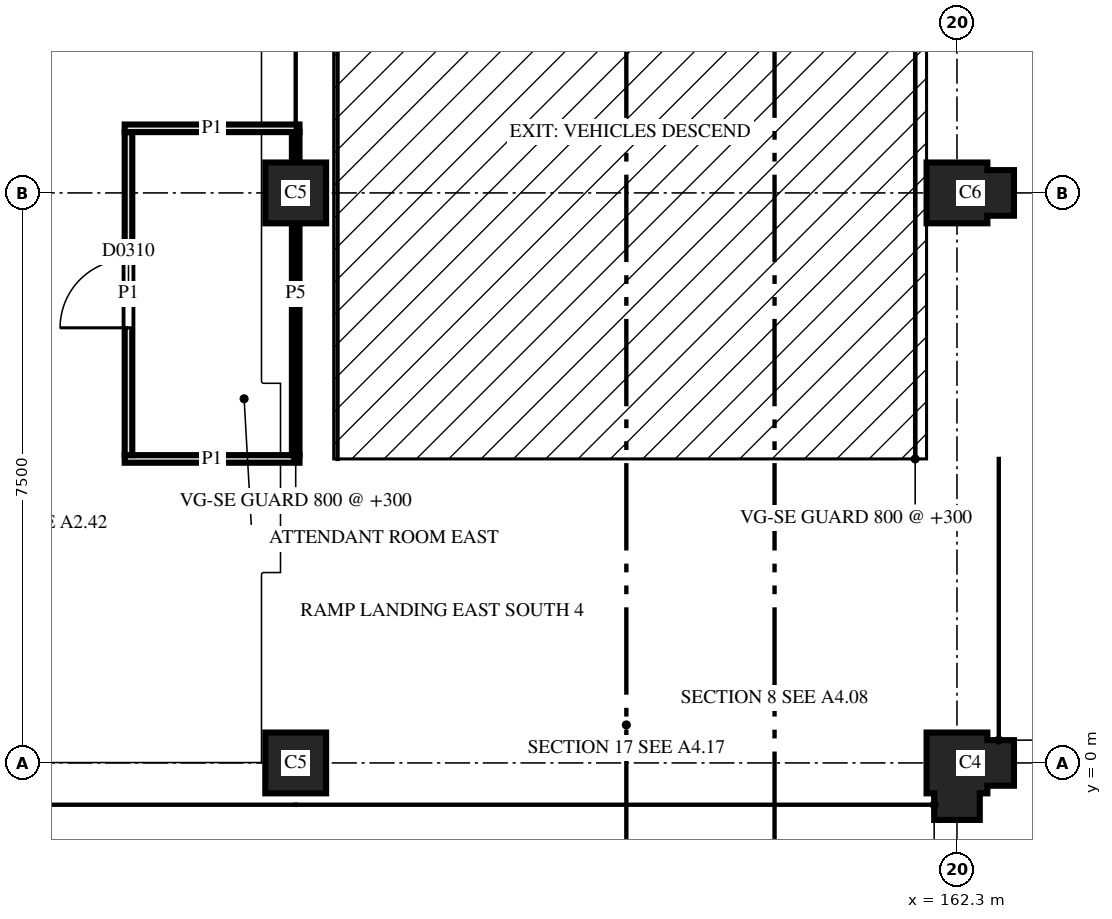
"""IFC4 building model, lengths in metres.
Left out: names, types, materials, properties, quantities, classifications, styles, units other than length and angle.
Written with IfcOpenShell. Run it as: python <this file> out.ifc"""

import sys

from ifc_helpers import new_model, si_unit, direction, frame, frame_2d, origin, place, context, subcontext, project, spatial, polyline, rectangle, outline, extrude, element, fill, save


model = new_model("IFC4")
c1 = context("Model", 3, precision=1e-05, world=origin(), true_north=direction((0.0, 1.0)))
c2 = subcontext(c1, "Body", "Model", "MODEL_VIEW")
j1 = project(units=[si_unit("LENGTHUNIT", "METRE"), si_unit("PLANEANGLEUNIT", "RADIAN")], contexts=[c1])
p1 = place(None, origin())
s1 = spatial("IfcSite", under=j1, at=p1, CompositionType="ELEMENT")
p2 = place(p1, origin())
s2 = spatial("IfcBuilding", under=s1, at=p2, CompositionType="ELEMENT")
p3 = place(p2, frame((0.0, 0.0, 11.9)))
s3 = spatial("IfcBuildingStorey", under=s2, at=p3, CompositionType="ELEMENT", Elevation=11.9)
p4 = place(p3, frame((153.6, 0.0, 0.0), z_axis=(0.0, 0.0, 1.0), x_axis=(1.0, 0.0, 0.0)))
e1 = element("IfcColumn", 1, at=p4, inside=s3, PredefinedType="COLUMN", context=c2, shape_type="SweptSolid", body=[
    extrude(outline(polyline([(-0.4, -0.4), (0.4, -0.4), (0.4, 0.4), (-0.4, 0.4), (-0.4, -0.4)])), origin(), (0.0, 0.0, 1.0), 3.7),
])
p5 = place(p3, frame((162.3, 0.0, 0.0), z_axis=(0.0, 0.0, 1.0), x_axis=(0.0, -1.0, 0.0)))
e2 = element("IfcColumn", 2, at=p5, inside=s3, PredefinedType="COLUMN", context=c2, shape_type="SweptSolid", body=[
    extrude(outline(polyline([(-0.4, -0.4), (0.4, -0.4), (0.4, -0.3), (0.75, -0.3), (0.75, 0.3), (0.4, 0.3), (0.4, 0.4), (0.3, 0.4), (0.3, 0.75), (-0.3, 0.75), (-0.3, 0.4), (-0.4, 0.4), (-0.4, -0.4)])), origin(), (0.0, 0.0, 1.0), 3.7),
])
p6 = place(p3, frame((153.6, 7.5, 0.0), z_axis=(0.0, 0.0, 1.0), x_axis=(1.0, 0.0, 0.0)))
e3 = element("IfcColumn", 3, at=p6, inside=s3, PredefinedType="COLUMN", context=c2, shape_type="SweptSolid", body=[
    extrude(outline(polyline([(-0.4, -0.4), (0.4, -0.4), (0.4, 0.4), (-0.4, 0.4), (-0.4, -0.4)])), origin(), (0.0, 0.0, 1.0), 3.7),
])
p7 = place(p3, frame((162.3, 7.5, 0.0), z_axis=(0.0, 0.0, 1.0), x_axis=(1.0, 0.0, 0.0)))
e4 = element("IfcColumn", 4, at=p7, inside=s3, PredefinedType="COLUMN", context=c2, shape_type="SweptSolid", body=[
    extrude(outline(polyline([(-0.4, -0.4), (0.4, -0.4), (0.4, -0.3), (0.75, -0.3), (0.75, 0.3), (0.4, 0.3), (0.4, 0.4), (-0.4, 0.4), (-0.4, -0.4)])), origin(), (0.0, 0.0, 1.0), 3.7),
])
p8 = place(p3, frame((151.35, 4.0, 0.0), z_axis=(0.0, 0.0, 1.0), x_axis=(1.0, 0.0, 0.0)))
e5 = element("IfcWall", 5, at=p8, inside=s3, PredefinedType="PARTITIONING", context=c2, shape_type="SweptSolid", body=[
    extrude(rectangle(XDim=2.3, YDim=0.1, at=frame_2d((1.15, 0.0))), origin(), (0.0, 0.0, 1.0), 2.88),
])
p9 = place(p3, frame((153.6, 4.05, 0.0), z_axis=(0.0, 0.0, 1.0), x_axis=(0.0, 1.0, 0.0)))
e6 = element("IfcWall", 6, at=p9, inside=s3, PredefinedType="PARTITIONING", context=c2, shape_type="SweptSolid", body=[
    extrude(rectangle(XDim=4.25, YDim=0.1, at=frame_2d((2.125, 0.0))), origin(), (0.0, 0.0, 1.0), 2.6),
])
p10 = place(p3, frame((151.4, 8.3, 0.0), z_axis=(0.0, 0.0, 1.0), x_axis=(0.0, -1.0, 0.0)))
e7 = element("IfcWall", 7, at=p10, inside=s3, PredefinedType="PARTITIONING", context=c2, shape_type="SweptSolid", body=[
    extrude(rectangle(XDim=4.25, YDim=0.1, at=frame_2d((2.125, 0.0))), origin(), (0.0, 0.0, 1.0), 2.88),
])
p11 = place(p10, frame((1.675, 0.0, 0.0)))
e8 = element("IfcOpeningElement", 8, at=p11, cuts=e7, PredefinedType="OPENING", context=c2, shape_type="SweptSolid", body=[
    extrude(rectangle(XDim=0.9, YDim=2.1, at=frame_2d((0.45, 1.05))), frame((0.0, 0.06, 0.0), z_axis=(0.0, -1.0, 0.0), x_axis=(1.0, 0.0, 0.0)), (0.0, 0.0, 1.0), 0.12),
])
p12 = place(p3, frame((153.65, 8.35, 0.0), z_axis=(0.0, 0.0, 1.0), x_axis=(-1.0, 0.0, 0.0)))
e9 = element("IfcWall", 9, at=p12, inside=s3, PredefinedType="PARTITIONING", context=c2, shape_type="SweptSolid", body=[
    extrude(rectangle(XDim=2.3, YDim=0.1, at=frame_2d((1.15, 0.0))), origin(), (0.0, 0.0, 1.0), 2.88),
])
p13 = place(p11, origin())
e10 = element("IfcDoor", 10, at=p13, inside=s3, OperationType="SINGLE_SWING_RIGHT", PredefinedType="DOOR", context=c2, shape_type="SweptSolid", body=[
    extrude(rectangle(XDim=0.9, YDim=2.1, at=frame_2d((0.45, 1.05))), frame((0.0, 0.025, 0.0), z_axis=(0.0, -1.0, 0.0), x_axis=(1.0, 0.0, 0.0)), (0.0, 0.0, 1.0), 0.05),
])
fill(e8, e10)
save(model, sys.argv[1])
